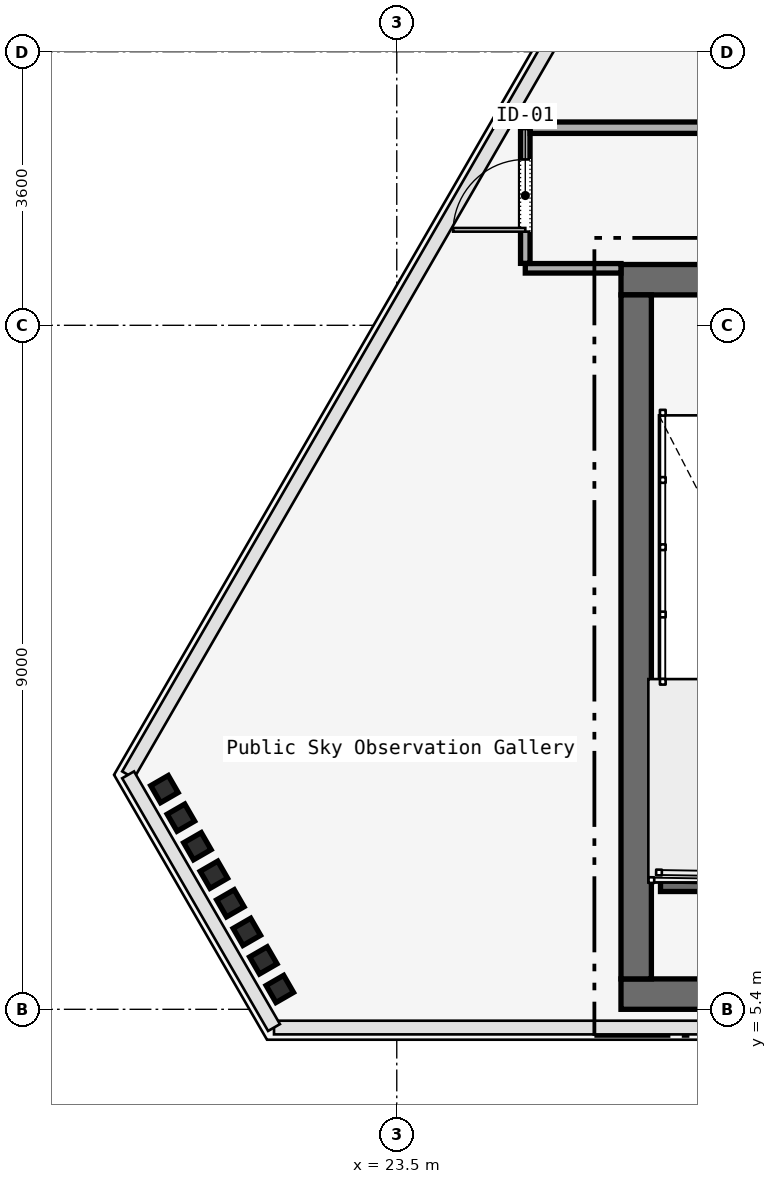
"""IFC4 building model, lengths in metres.
Left out: names, types, materials, properties, quantities, classifications, styles, units other than length and angle.
Written with IfcOpenShell. Run it as: python <this file> out.ifc"""

import sys

from ifc_helpers import new_model, si_unit, direction, frame, frame_2d, origin, origin_2d, place, context, subcontext, project, spatial, rectangle, i_section, extrude, element, fill, save


model = new_model("IFC4")
c1 = context("Model", 3, precision=1e-05, world=origin(), true_north=direction((0.0, 1.0)))
c2 = subcontext(c1, "Body", "Model", "MODEL_VIEW")
j1 = project(units=[si_unit("LENGTHUNIT", "METRE"), si_unit("PLANEANGLEUNIT", "RADIAN")], contexts=[c1])
p1 = place(None, origin())
s1 = spatial("IfcSite", under=j1, at=p1, CompositionType="ELEMENT")
p2 = place(p1, origin())
s2 = spatial("IfcBuilding", under=s1, at=p2, CompositionType="ELEMENT")
p3 = place(p2, frame((0.0, 0.0, 298.5)))
s3 = spatial("IfcBuildingStorey", under=s2, at=p3, CompositionType="ELEMENT", Elevation=298.5)
p4 = place(p3, frame((26.45, 15.0, 0.0), z_axis=(0.0, 0.0, 1.0), x_axis=(1.0, 0.0, 0.0)))
e1 = element("IfcWall", 1, at=p4, inside=s3, PredefinedType="SOLIDWALL", context=c2, shape_type="SweptSolid", body=[
    extrude(rectangle(XDim=31.1, YDim=0.4, at=frame_2d((15.55, 0.0))), origin(), (0.0, 0.0, 1.0), 4.52),
])
p5 = place(p4, frame((1.65, 0.0, 0.0)))
e2 = element("IfcOpeningElement", 2, at=p5, cuts=e1, PredefinedType="OPENING", context=c2, shape_type="SweptSolid", body=[
    extrude(rectangle(XDim=1.1, YDim=2.2, at=frame_2d((0.55, 1.1))), frame((0.0, 0.2, 0.0), z_axis=(0.0, -1.0, 0.0), x_axis=(1.0, 0.0, 0.0)), (0.0, 0.0, 1.0), 0.4),
])
p6 = place(p4, frame((13.65, 0.0, 0.0)))
e3 = element("IfcOpeningElement", 3, at=p6, cuts=e1, PredefinedType="OPENING", context=c2, shape_type="SweptSolid", body=[
    extrude(rectangle(XDim=1.1, YDim=2.2, at=frame_2d((0.55, 1.1))), frame((0.0, 0.2, 0.0), z_axis=(0.0, -1.0, 0.0), x_axis=(1.0, 0.0, 0.0)), (0.0, 0.0, 1.0), 0.4),
])
p7 = place(p4, frame((25.55, 0.0, 0.0)))
e4 = element("IfcOpeningElement", 4, at=p7, cuts=e1, PredefinedType="OPENING", context=c2, shape_type="SweptSolid", body=[
    extrude(rectangle(XDim=1.1, YDim=2.2, at=frame_2d((0.55, 1.1))), frame((0.0, 0.2, 0.0), z_axis=(0.0, -1.0, 0.0), x_axis=(1.0, 0.0, 0.0)), (0.0, 0.0, 1.0), 0.4),
])
p8 = place(p4, frame((19.35, 0.0, 0.0)))
e5 = element("IfcOpeningElement", 5, at=p8, cuts=e1, PredefinedType="OPENING", context=c2, shape_type="SweptSolid", body=[
    extrude(rectangle(XDim=1.1, YDim=2.2, at=frame_2d((0.55, 1.1))), frame((0.0, 0.2, 0.0), z_axis=(0.0, -1.0, 0.0), x_axis=(1.0, 0.0, 0.0)), (0.0, 0.0, 1.0), 0.4),
])
p9 = place(p4, frame((21.4, 0.0, 0.0)))
e6 = element("IfcOpeningElement", 6, at=p9, cuts=e1, PredefinedType="OPENING", context=c2, shape_type="SweptSolid", body=[
    extrude(rectangle(XDim=0.9, YDim=2.1, at=frame_2d((0.45, 1.05))), frame((0.0, 0.2, 0.0), z_axis=(0.0, -1.0, 0.0), x_axis=(1.0, 0.0, 0.0)), (0.0, 0.0, 1.0), 0.4),
])
p10 = place(p4, frame((6.54, 0.0, 0.0)))
e7 = element("IfcOpeningElement", 7, at=p10, cuts=e1, PredefinedType="OPENING", context=c2, shape_type="SweptSolid", body=[
    extrude(rectangle(XDim=0.95, YDim=2.2, at=frame_2d((0.475, 1.1))), frame((0.0, 0.2, 0.0), z_axis=(0.0, -1.0, 0.0), x_axis=(1.0, 0.0, 0.0)), (0.0, 0.0, 1.0), 0.4),
])
p11 = place(p4, frame((10.49, 0.0, 0.0)))
e8 = element("IfcOpeningElement", 8, at=p11, cuts=e1, PredefinedType="OPENING", context=c2, shape_type="SweptSolid", body=[
    extrude(rectangle(XDim=0.95, YDim=2.2, at=frame_2d((0.475, 1.1))), frame((0.0, 0.2, 0.0), z_axis=(0.0, -1.0, 0.0), x_axis=(1.0, 0.0, 0.0)), (0.0, 0.0, 1.0), 0.4),
])
p12 = place(p4, frame((23.35, 0.0, 0.0)))
e9 = element("IfcOpeningElement", 9, at=p12, cuts=e1, PredefinedType="OPENING", context=c2, shape_type="SweptSolid", body=[
    extrude(rectangle(XDim=1.3, YDim=2.3, at=frame_2d((0.65, 1.15))), frame((0.0, 0.2, 0.0), z_axis=(0.0, -1.0, 0.0), x_axis=(1.0, 0.0, 0.0)), (0.0, 0.0, 1.0), 0.4),
])
p13 = place(p3, frame((26.45, 5.6, 0.0), z_axis=(0.0, 0.0, 1.0), x_axis=(1.0, 0.0, 0.0)))
e10 = element("IfcWall", 10, at=p13, inside=s3, PredefinedType="SOLIDWALL", context=c2, shape_type="SweptSolid", body=[
    extrude(rectangle(XDim=31.1, YDim=0.4, at=frame_2d((15.55, 0.0))), origin(), (0.0, 0.0, 1.0), 4.52),
])
p14 = place(p3, frame((26.65, 5.8, 0.0), z_axis=(0.0, 0.0, 1.0), x_axis=(0.0, 1.0, 0.0)))
e11 = element("IfcWall", 11, at=p14, inside=s3, PredefinedType="SOLIDWALL", context=c2, shape_type="SweptSolid", body=[
    extrude(rectangle(XDim=9.0, YDim=0.4, at=frame_2d((4.5, 0.0))), origin(), (0.0, 0.0, 1.0), 4.52),
])
for number, where, z_axis, x_axis in (
    (12, (20.443, 8.297, 0.0), (0.0, 0.0, 1.0), (-0.5, 0.866, 0.0)),
    (13, (20.66, 7.922, 0.0), (0.0, 0.0, 1.0), (-0.5, 0.866, 0.0)),
    (14, (20.877, 7.546, 0.0), (0.0, 0.0, 1.0), (-0.5, 0.866, 0.0)),
    (15, (21.094, 7.17, 0.0), (0.0, 0.0, 1.0), (-0.5, 0.866, 0.0)),
    (16, (21.311, 6.795, 0.0), (0.0, 0.0, 1.0), (-0.5, 0.866, 0.0)),
    (17, (21.528, 6.419, 0.0), (0.0, 0.0, 1.0), (-0.5, 0.866, 0.0)),
    (18, (21.744, 6.043, 0.0), (0.0, 0.0, 1.0), (-0.5, 0.866, 0.0)),
    (19, (21.961, 5.668, 0.0), (0.0, 0.0, 1.0), (-0.5, 0.866, 0.0)),
):
    element("IfcColumn", number, at=place(p3, frame(where, z_axis=z_axis, x_axis=x_axis)), inside=s3, PredefinedType="COLUMN", context=c2, shape_type="SweptSolid", body=[
        extrude(i_section(OverallWidth=0.259, OverallDepth=0.267, WebThickness=0.013, FlangeThickness=0.021, FilletRadius=0.013, at=origin_2d()), origin(), (0.0, 0.0, 1.0), 4.52),
    ])
p15 = place(p3, frame((26.97, 7.05, 0.0), z_axis=(0.0, 0.0, 1.0), x_axis=(1.0, 0.0, 0.0)))
e20 = element("IfcWall", 20, at=p15, inside=s3, PredefinedType="SOLIDWALL", context=c2, shape_type="SweptSolid", body=[
    extrude(rectangle(XDim=3.115, YDim=0.2, at=frame_2d((1.558, 0.0))), origin(), (0.0, 0.0, 1.0), 4.8),
])
p16 = place(p3, frame((26.45, 15.15, 0.0), z_axis=(0.0, 0.0, 1.0), x_axis=(-1.0, 0.0, 0.0)))
e21 = element("IfcWall", 21, at=p16, inside=s3, PredefinedType="PARTITIONING", context=c2, shape_type="SweptSolid", body=[
    extrude(rectangle(XDim=1.259, YDim=0.125, at=frame_2d((0.629, 0.0))), origin(), (0.0, 0.0, 1.0), 3.95),
])
p17 = place(p3, frame((25.191, 15.215, 0.0), z_axis=(0.0, 0.0, 1.0), x_axis=(0.0, 1.0, 0.0)))
e22 = element("IfcWall", 22, at=p17, inside=s3, PredefinedType="PARTITIONING", context=c2, shape_type="SweptSolid", body=[
    extrude(rectangle(XDim=1.785, YDim=0.125, at=frame_2d((0.893, 0.0))), origin(), (0.0, 0.0, 1.0), 3.95),
])
p18 = place(p17, frame((0.417, 0.0, 0.0)))
e23 = element("IfcOpeningElement", 23, at=p18, cuts=e22, PredefinedType="OPENING", context=c2, shape_type="SweptSolid", body=[
    extrude(rectangle(XDim=0.95, YDim=2.2, at=frame_2d((0.475, 1.1))), frame((0.0, 0.062, 0.0), z_axis=(0.0, -1.0, 0.0), x_axis=(1.0, 0.0, 0.0)), (0.0, 0.0, 1.0), 0.125),
])
p19 = place(p3, frame((25.256, 17.0, 0.0), z_axis=(0.0, 0.0, 1.0), x_axis=(1.0, 0.0, 0.0)))
e24 = element("IfcWall", 24, at=p19, inside=s3, PredefinedType="PARTITIONING", context=c2, shape_type="SweptSolid", body=[
    extrude(rectangle(XDim=6.944, YDim=0.15, at=frame_2d((3.472, 0.0))), origin(), (0.0, 0.0, 1.0), 3.95),
])
p20 = place(p19, frame((2.997, 0.0, 0.0)))
e25 = element("IfcOpeningElement", 25, at=p20, cuts=e24, PredefinedType="OPENING", context=c2, shape_type="SweptSolid", body=[
    extrude(rectangle(XDim=0.95, YDim=2.2, at=frame_2d((0.475, 1.1))), frame((0.0, 0.075, 0.0), z_axis=(0.0, -1.0, 0.0), x_axis=(1.0, 0.0, 0.0)), (0.0, 0.0, 1.0), 0.15),
])
p21 = place(p18, origin())
e26 = element("IfcDoor", 26, at=p21, inside=s3, OperationType="SINGLE_SWING_RIGHT", PredefinedType="DOOR", context=c2, shape_type="SweptSolid", body=[
    extrude(rectangle(XDim=0.95, YDim=2.2, at=frame_2d((0.475, 1.1))), frame((0.0, 0.025, 0.0), z_axis=(0.0, -1.0, 0.0), x_axis=(1.0, 0.0, 0.0)), (0.0, 0.0, 1.0), 0.05),
])
fill(e23, e26)
save(model, sys.argv[1])
